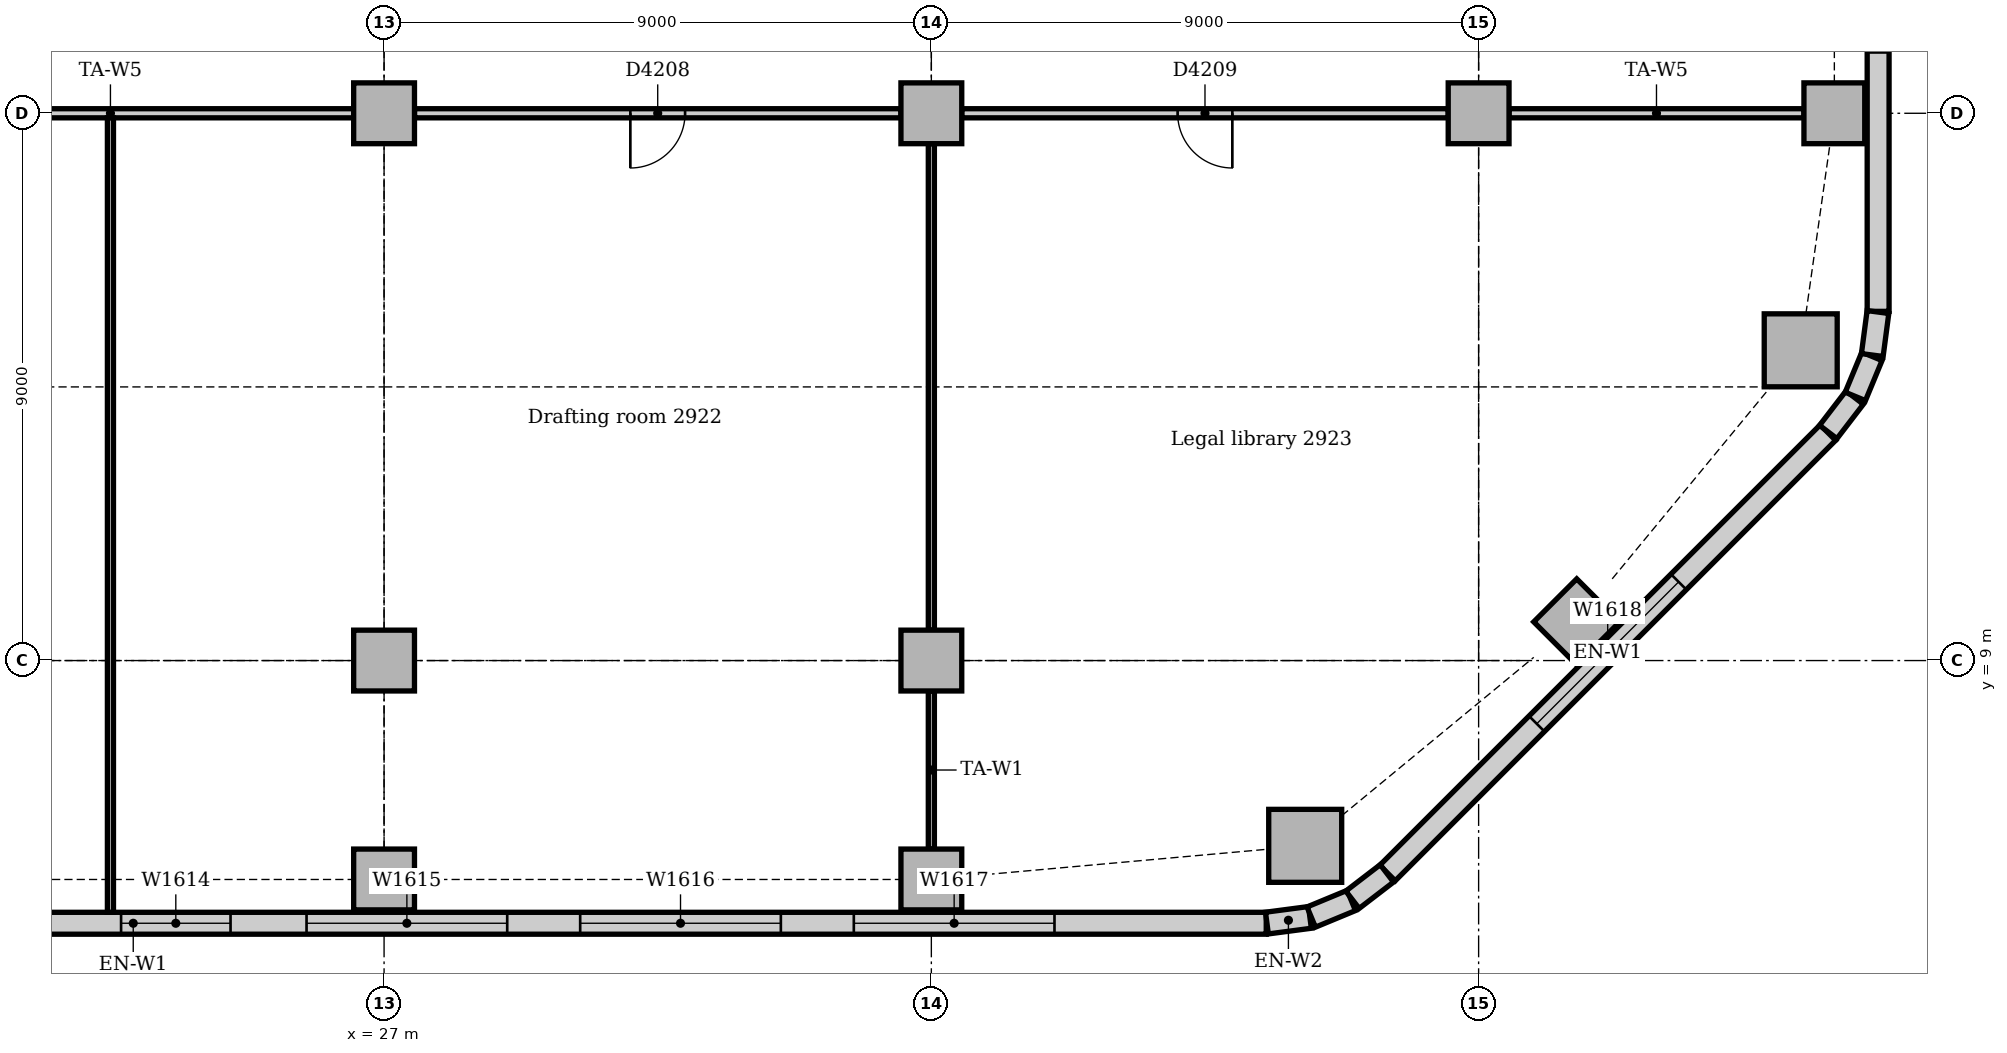
"""IFC4 building model, lengths in metres.
Left out: names, types, materials, properties, quantities, classifications, styles, units other than length and angle.
Written with IfcOpenShell. Run it as: python <this file> out.ifc"""

import sys

from ifc_helpers import new_model, si_unit, direction, frame, frame_2d, origin, origin_2d, place, context, subcontext, project, spatial, rectangle, extrude, element, fill, save


model = new_model("IFC4")
c1 = context("Model", 3, precision=1e-05, world=origin(), true_north=direction((0.0, 1.0)))
c2 = subcontext(c1, "Body", "Model", "MODEL_VIEW")
j1 = project(units=[si_unit("LENGTHUNIT", "METRE"), si_unit("PLANEANGLEUNIT", "RADIAN")], contexts=[c1])
p1 = place(None, origin())
s1 = spatial("IfcSite", under=j1, at=p1, CompositionType="ELEMENT")
p2 = place(p1, origin())
s2 = spatial("IfcBuilding", under=s1, at=p2, CompositionType="ELEMENT")
p3 = place(p2, frame((0.0, 0.0, 124.0)))
s3 = spatial("IfcBuildingStorey", under=s2, at=p3, CompositionType="ELEMENT", Elevation=124.0)
for number, where, z_axis, x_axis in (
    (1, (42.148, 5.953, 0.0), (0.0, 0.0, 1.0), (1.0, 0.0, 0.0)),
    (2, (50.297, 14.102, 0.0), (0.0, 0.0, 1.0), (1.0, 0.0, 0.0)),
):
    element("IfcColumn", number, at=place(p3, frame(where, z_axis=z_axis, x_axis=x_axis)), inside=s3, PredefinedType="COLUMN", context=c2, shape_type="SweptSolid", body=[
        extrude(rectangle(XDim=1.2, YDim=1.2, at=origin_2d()), origin(), (0.0, 0.0, 1.0), 3.85),
    ])
for number, where, z_axis, x_axis in (
    (3, (27.0, 5.4, 0.0), (0.0, 0.0, 1.0), (1.0, 0.0, 0.0)),
    (4, (36.0, 5.4, 0.0), (0.0, 0.0, 1.0), (1.0, 0.0, 0.0)),
    (5, (46.614, 9.636, 0.0), (0.0, 0.0, 1.0), (0.707, 0.707, 0.0)),
    (6, (50.85, 18.0, 0.0), (0.0, 0.0, 1.0), (1.0, 0.0, 0.0)),
    (7, (27.0, 9.0, 0.0), (0.0, 0.0, 1.0), (1.0, 0.0, 0.0)),
    (8, (27.0, 18.0, 0.0), (0.0, 0.0, 1.0), (1.0, 0.0, 0.0)),
    (9, (36.0, 9.0, 0.0), (0.0, 0.0, 1.0), (1.0, 0.0, 0.0)),
    (10, (36.0, 18.0, 0.0), (0.0, 0.0, 1.0), (1.0, 0.0, 0.0)),
    (11, (45.0, 18.0, 0.0), (0.0, 0.0, 1.0), (1.0, 0.0, 0.0)),
):
    element("IfcColumn", number, at=place(p3, frame(where, z_axis=z_axis, x_axis=x_axis)), inside=s3, PredefinedType="COLUMN", context=c2, shape_type="SweptSolid", body=[
        extrude(rectangle(XDim=1.0, YDim=1.0, at=origin_2d()), origin(), (0.0, 0.0, 1.0), 3.85),
    ])
p4 = place(p3, frame((4.243, 4.68, 0.0), z_axis=(0.0, 0.0, 1.0), x_axis=(1.0, 0.0, 0.0)))
e12 = element("IfcWall", 12, at=p4, inside=s3, PredefinedType="STANDARD", context=c2, shape_type="SweptSolid", body=[
    extrude(rectangle(XDim=37.265, YDim=0.36, at=frame_2d((18.632, 0.0))), origin(), (0.0, 0.0, 1.0), 3.85),
])
p5 = place(p4, frame((3.482, 0.0, 0.9)))
e13 = element("IfcOpeningElement", 13, at=p5, cuts=e12, PredefinedType="OPENING", context=c2, shape_type="SweptSolid", body=[
    extrude(rectangle(XDim=3.3, YDim=1.6, at=frame_2d((1.65, 0.8))), frame((0.0, 0.19, 0.0), z_axis=(0.0, -1.0, 0.0), x_axis=(1.0, 0.0, 0.0)), (0.0, 0.0, 1.0), 0.38),
])
p6 = place(p4, frame((9.432, 0.0, 0.9)))
e14 = element("IfcOpeningElement", 14, at=p6, cuts=e12, PredefinedType="OPENING", context=c2, shape_type="SweptSolid", body=[
    extrude(rectangle(XDim=1.8, YDim=1.6, at=frame_2d((0.9, 0.8))), frame((0.0, 0.19, 0.0), z_axis=(0.0, -1.0, 0.0), x_axis=(1.0, 0.0, 0.0)), (0.0, 0.0, 1.0), 0.38),
])
p7 = place(p4, frame((12.482, 0.0, 0.9)))
e15 = element("IfcOpeningElement", 15, at=p7, cuts=e12, PredefinedType="OPENING", context=c2, shape_type="SweptSolid", body=[
    extrude(rectangle(XDim=3.3, YDim=1.6, at=frame_2d((1.65, 0.8))), frame((0.0, 0.19, 0.0), z_axis=(0.0, -1.0, 0.0), x_axis=(1.0, 0.0, 0.0)), (0.0, 0.0, 1.0), 0.38),
])
p8 = place(p4, frame((18.432, 0.0, 0.9)))
e16 = element("IfcOpeningElement", 16, at=p8, cuts=e12, PredefinedType="OPENING", context=c2, shape_type="SweptSolid", body=[
    extrude(rectangle(XDim=1.8, YDim=1.6, at=frame_2d((0.9, 0.8))), frame((0.0, 0.19, 0.0), z_axis=(0.0, -1.0, 0.0), x_axis=(1.0, 0.0, 0.0)), (0.0, 0.0, 1.0), 0.38),
])
p9 = place(p4, frame((21.482, 0.0, 0.9)))
e17 = element("IfcOpeningElement", 17, at=p9, cuts=e12, PredefinedType="OPENING", context=c2, shape_type="SweptSolid", body=[
    extrude(rectangle(XDim=3.3, YDim=1.6, at=frame_2d((1.65, 0.8))), frame((0.0, 0.19, 0.0), z_axis=(0.0, -1.0, 0.0), x_axis=(1.0, 0.0, 0.0)), (0.0, 0.0, 1.0), 0.38),
])
p10 = place(p4, frame((25.982, 0.0, 0.9)))
e18 = element("IfcOpeningElement", 18, at=p10, cuts=e12, PredefinedType="OPENING", context=c2, shape_type="SweptSolid", body=[
    extrude(rectangle(XDim=3.3, YDim=1.6, at=frame_2d((1.65, 0.8))), frame((0.0, 0.19, 0.0), z_axis=(0.0, -1.0, 0.0), x_axis=(1.0, 0.0, 0.0)), (0.0, 0.0, 1.0), 0.38),
])
p11 = place(p4, frame((30.482, 0.0, 0.9)))
e19 = element("IfcOpeningElement", 19, at=p11, cuts=e12, PredefinedType="OPENING", context=c2, shape_type="SweptSolid", body=[
    extrude(rectangle(XDim=3.3, YDim=1.6, at=frame_2d((1.65, 0.8))), frame((0.0, 0.19, 0.0), z_axis=(0.0, -1.0, 0.0), x_axis=(1.0, 0.0, 0.0)), (0.0, 0.0, 1.0), 0.38),
])
p12 = place(p3, frame((43.501, 5.506, 0.0), z_axis=(0.0, 0.0, 1.0), x_axis=(0.707106781187, 0.707106781187, 0.0)))
e20 = element("IfcWall", 20, at=p12, inside=s3, PredefinedType="STANDARD", context=c2, shape_type="SweptSolid", body=[
    extrude(rectangle(XDim=10.243, YDim=0.36, at=frame_2d((5.121, 0.0))), origin(), (0.0, 0.0, 1.0), 3.85),
])
p13 = place(p12, frame((3.471, 0.0, 0.9)))
e21 = element("IfcOpeningElement", 21, at=p13, cuts=e20, PredefinedType="OPENING", context=c2, shape_type="SweptSolid", body=[
    extrude(rectangle(XDim=3.3, YDim=1.6, at=frame_2d((1.65, 0.8))), frame((0.0, 0.19, 0.0), z_axis=(0.0, -1.0, 0.0), x_axis=(1.0, 0.0, 0.0)), (0.0, 0.0, 1.0), 0.38),
])
p14 = place(p3, frame((51.57, 14.743, 0.0), z_axis=(0.0, 0.0, 1.0), x_axis=(0.0, 1.0, 0.0)))
e22 = element("IfcWall", 22, at=p14, inside=s3, PredefinedType="STANDARD", context=c2, shape_type="SweptSolid", body=[
    extrude(rectangle(XDim=24.515, YDim=0.36, at=frame_2d((12.257, 0.0))), origin(), (0.0, 0.0, 1.0), 3.85),
])
p15 = place(p14, frame((4.257, 0.0, 0.9)))
e23 = element("IfcOpeningElement", 23, at=p15, cuts=e22, PredefinedType="OPENING", context=c2, shape_type="SweptSolid", body=[
    extrude(rectangle(XDim=1.8, YDim=1.6, at=frame_2d((0.9, 0.8))), frame((0.0, 0.19, 0.0), z_axis=(0.0, -1.0, 0.0), x_axis=(1.0, 0.0, 0.0)), (0.0, 0.0, 1.0), 0.38),
])
p16 = place(p14, frame((8.357, 0.0, 0.9)))
e24 = element("IfcOpeningElement", 24, at=p16, cuts=e22, PredefinedType="OPENING", context=c2, shape_type="SweptSolid", body=[
    extrude(rectangle(XDim=3.3, YDim=1.6, at=frame_2d((1.65, 0.8))), frame((0.0, 0.19, 0.0), z_axis=(0.0, -1.0, 0.0), x_axis=(1.0, 0.0, 0.0)), (0.0, 0.0, 1.0), 0.38),
])
p17 = place(p14, frame((12.857, 0.0, 0.9)))
e25 = element("IfcOpeningElement", 25, at=p17, cuts=e22, PredefinedType="OPENING", context=c2, shape_type="SweptSolid", body=[
    extrude(rectangle(XDim=3.3, YDim=1.6, at=frame_2d((1.65, 0.8))), frame((0.0, 0.19, 0.0), z_axis=(0.0, -1.0, 0.0), x_axis=(1.0, 0.0, 0.0)), (0.0, 0.0, 1.0), 0.38),
])
p18 = place(p14, frame((17.357, 0.0, 0.9)))
e26 = element("IfcOpeningElement", 26, at=p18, cuts=e22, PredefinedType="OPENING", context=c2, shape_type="SweptSolid", body=[
    extrude(rectangle(XDim=3.3, YDim=1.6, at=frame_2d((1.65, 0.8))), frame((0.0, 0.19, 0.0), z_axis=(0.0, -1.0, 0.0), x_axis=(1.0, 0.0, 0.0)), (0.0, 0.0, 1.0), 0.38),
])
for number, where, z_axis, x_axis in (
    (27, (41.519, 4.683, 0.0), (0.0, 0.0, 1.0), (0.991, 0.131, 0.0)),
    (28, (42.247, 4.782, 0.0), (0.0, 0.0, 1.0), (0.924, 0.383, 0.0)),
):
    element("IfcWall", number, at=place(p3, frame(where, z_axis=z_axis, x_axis=x_axis)), inside=s3, PredefinedType="STANDARD", context=c2, shape_type="SweptSolid", body=[
        extrude(rectangle(XDim=0.713, YDim=0.36, at=frame_2d((0.356, 0.0))), origin(), (0.0, 0.0, 1.0), 3.85),
    ])
for number, where, z_axis, x_axis in (
    (29, (42.925, 5.066, 0.0), (0.0, 0.0, 1.0), (0.793, 0.609, 0.0)),
    (30, (50.75, 12.759, 0.0), (0.0, 0.0, 1.0), (0.609, 0.793, 0.0)),
):
    element("IfcWall", number, at=place(p3, frame(where, z_axis=z_axis, x_axis=x_axis)), inside=s3, PredefinedType="STANDARD", context=c2, shape_type="SweptSolid", body=[
        extrude(rectangle(XDim=0.713, YDim=0.36, at=frame_2d((0.357, 0.0))), origin(), (0.0, 0.0, 1.0), 3.85),
    ])
for number, where, z_axis, x_axis in (
    (31, (51.195, 13.344, 0.0), (0.0, 0.0, 1.0), (0.383, 0.924, 0.0)),
    (32, (51.474, 14.024, 0.0), (0.0, 0.0, 1.0), (0.131, 0.991, 0.0)),
):
    element("IfcWall", number, at=place(p3, frame(where, z_axis=z_axis, x_axis=x_axis)), inside=s3, PredefinedType="STANDARD", context=c2, shape_type="SweptSolid", body=[
        extrude(rectangle(XDim=0.713, YDim=0.36, at=frame_2d((0.356, 0.0))), origin(), (0.0, 0.0, 1.0), 3.85),
    ])
p19 = place(p3, frame((45.5, 18.0, 0.0), z_axis=(0.0, 0.0, 1.0), x_axis=(1.0, 0.0, 0.0)))
e33 = element("IfcWall", 33, at=p19, inside=s3, PredefinedType="PARTITIONING", context=c2, shape_type="SweptSolid", body=[
    extrude(rectangle(XDim=4.85, YDim=0.15, at=frame_2d((2.425, 0.0))), origin(), (0.0, 0.0, 1.0), 3.254),
])
p20 = place(p3, frame((36.5, 18.0, 0.0), z_axis=(0.0, 0.0, 1.0), x_axis=(1.0, 0.0, 0.0)))
e34 = element("IfcWall", 34, at=p20, inside=s3, PredefinedType="PARTITIONING", context=c2, shape_type="SweptSolid", body=[
    extrude(rectangle(XDim=8.0, YDim=0.15, at=frame_2d((4.0, 0.0))), origin(), (0.0, 0.0, 1.0), 3.158),
])
p21 = place(p20, frame((3.55, 0.0, 0.0)))
e35 = element("IfcOpeningElement", 35, at=p21, cuts=e34, PredefinedType="OPENING", context=c2, shape_type="SweptSolid", body=[
    extrude(rectangle(XDim=0.9, YDim=2.1, at=frame_2d((0.45, 1.05))), frame((0.0, 0.085, 0.0), z_axis=(0.0, -1.0, 0.0), x_axis=(1.0, 0.0, 0.0)), (0.0, 0.0, 1.0), 0.17),
])
p22 = place(p3, frame((27.5, 18.0, 0.0), z_axis=(0.0, 0.0, 1.0), x_axis=(1.0, 0.0, 0.0)))
e36 = element("IfcWall", 36, at=p22, inside=s3, PredefinedType="PARTITIONING", context=c2, shape_type="SweptSolid", body=[
    extrude(rectangle(XDim=8.0, YDim=0.15, at=frame_2d((4.0, 0.0))), origin(), (0.0, 0.0, 1.0), 3.158),
])
p23 = place(p22, frame((3.55, 0.0, 0.0)))
e37 = element("IfcOpeningElement", 37, at=p23, cuts=e36, PredefinedType="OPENING", context=c2, shape_type="SweptSolid", body=[
    extrude(rectangle(XDim=0.9, YDim=2.1, at=frame_2d((0.45, 1.05))), frame((0.0, 0.085, 0.0), z_axis=(0.0, -1.0, 0.0), x_axis=(1.0, 0.0, 0.0)), (0.0, 0.0, 1.0), 0.17),
])
p24 = place(p3, frame((18.5, 18.0, 0.0), z_axis=(0.0, 0.0, 1.0), x_axis=(1.0, 0.0, 0.0)))
e38 = element("IfcWall", 38, at=p24, inside=s3, PredefinedType="PARTITIONING", context=c2, shape_type="SweptSolid", body=[
    extrude(rectangle(XDim=8.0, YDim=0.15, at=frame_2d((4.0, 0.0))), origin(), (0.0, 0.0, 1.0), 3.158),
])
p25 = place(p24, frame((1.6, 0.0, 0.0)))
e39 = element("IfcOpeningElement", 39, at=p25, cuts=e38, PredefinedType="OPENING", context=c2, shape_type="SweptSolid", body=[
    extrude(rectangle(XDim=0.9, YDim=2.1, at=frame_2d((0.45, 1.05))), frame((0.0, 0.085, 0.0), z_axis=(0.0, -1.0, 0.0), x_axis=(1.0, 0.0, 0.0)), (0.0, 0.0, 1.0), 0.17),
])
p26 = place(p3, frame((22.5, 4.86, 0.0), z_axis=(0.0, 0.0, 1.0), x_axis=(0.0, 1.0, 0.0)))
e40 = element("IfcWall", 40, at=p26, inside=s3, PredefinedType="PARTITIONING", context=c2, shape_type="SweptSolid", body=[
    extrude(rectangle(XDim=13.065, YDim=0.1, at=frame_2d((6.532, 0.0))), origin(), (0.0, 0.0, 1.0), 3.85),
])
p27 = place(p3, frame((36.0, 5.9, 0.0), z_axis=(0.0, 0.0, 1.0), x_axis=(0.0, 1.0, 0.0)))
e41 = element("IfcWall", 41, at=p27, inside=s3, PredefinedType="PARTITIONING", context=c2, shape_type="SweptSolid", body=[
    extrude(rectangle(XDim=2.6, YDim=0.1, at=frame_2d((1.3, 0.0))), origin(), (0.0, 0.0, 1.0), 3.652),
])
p28 = place(p3, frame((36.0, 9.5, 0.0), z_axis=(0.0, 0.0, 1.0), x_axis=(0.0, 1.0, 0.0)))
e42 = element("IfcWall", 42, at=p28, inside=s3, PredefinedType="PARTITIONING", context=c2, shape_type="SweptSolid", body=[
    extrude(rectangle(XDim=8.0, YDim=0.1, at=frame_2d((4.0, 0.0))), origin(), (0.0, 0.0, 1.0), 3.256),
])
p29 = place(p8, origin())
e43 = element("IfcWindow", 43, at=p29, inside=s3, PartitioningType="SINGLE_PANEL", PredefinedType="WINDOW", context=c2, shape_type="SweptSolid", body=[
    extrude(rectangle(XDim=1.8, YDim=1.6, at=frame_2d((0.9, 0.8))), frame((0.0, 0.13, 0.0), z_axis=(0.0, -1.0, 0.0), x_axis=(1.0, 0.0, 0.0)), (0.0, 0.0, 1.0), 0.06),
])
fill(e16, e43)
p30 = place(p9, origin())
e44 = element("IfcWindow", 44, at=p30, inside=s3, PartitioningType="SINGLE_PANEL", PredefinedType="WINDOW", context=c2, shape_type="SweptSolid", body=[
    extrude(rectangle(XDim=3.3, YDim=1.6, at=frame_2d((1.65, 0.8))), frame((0.0, 0.13, 0.0), z_axis=(0.0, -1.0, 0.0), x_axis=(1.0, 0.0, 0.0)), (0.0, 0.0, 1.0), 0.06),
])
fill(e17, e44)
p31 = place(p10, origin())
e45 = element("IfcWindow", 45, at=p31, inside=s3, PartitioningType="SINGLE_PANEL", PredefinedType="WINDOW", context=c2, shape_type="SweptSolid", body=[
    extrude(rectangle(XDim=3.3, YDim=1.6, at=frame_2d((1.65, 0.8))), frame((0.0, 0.13, 0.0), z_axis=(0.0, -1.0, 0.0), x_axis=(1.0, 0.0, 0.0)), (0.0, 0.0, 1.0), 0.06),
])
fill(e18, e45)
p32 = place(p11, origin())
e46 = element("IfcWindow", 46, at=p32, inside=s3, PartitioningType="SINGLE_PANEL", PredefinedType="WINDOW", context=c2, shape_type="SweptSolid", body=[
    extrude(rectangle(XDim=3.3, YDim=1.6, at=frame_2d((1.65, 0.8))), frame((0.0, 0.13, 0.0), z_axis=(0.0, -1.0, 0.0), x_axis=(1.0, 0.0, 0.0)), (0.0, 0.0, 1.0), 0.06),
])
fill(e19, e46)
p33 = place(p13, origin())
e47 = element("IfcWindow", 47, at=p33, inside=s3, PartitioningType="SINGLE_PANEL", PredefinedType="WINDOW", context=c2, shape_type="SweptSolid", body=[
    extrude(rectangle(XDim=3.3, YDim=1.6, at=frame_2d((1.65, 0.8))), frame((0.0, 0.13, 0.0), z_axis=(0.0, -1.0, 0.0), x_axis=(1.0, 0.0, 0.0)), (0.0, 0.0, 1.0), 0.06),
])
fill(e21, e47)
p34 = place(p23, frame((0.9, 0.0, 0.0), z_axis=(0.0, 0.0, 1.0), x_axis=(-1.0, 0.0, 0.0)))
e48 = element("IfcDoor", 48, at=p34, inside=s3, OperationType="SINGLE_SWING_RIGHT", PredefinedType="DOOR", context=c2, shape_type="SweptSolid", body=[
    extrude(rectangle(XDim=0.9, YDim=2.1, at=frame_2d((0.45, 1.05))), frame((0.0, 0.025, 0.0), z_axis=(0.0, -1.0, 0.0), x_axis=(1.0, 0.0, 0.0)), (0.0, 0.0, 1.0), 0.05),
])
fill(e37, e48)
p35 = place(p21, frame((0.9, 0.0, 0.0), z_axis=(0.0, 0.0, 1.0), x_axis=(-1.0, 0.0, 0.0)))
e49 = element("IfcDoor", 49, at=p35, inside=s3, OperationType="SINGLE_SWING_LEFT", PredefinedType="DOOR", context=c2, shape_type="SweptSolid", body=[
    extrude(rectangle(XDim=0.9, YDim=2.1, at=frame_2d((0.45, 1.05))), frame((0.0, 0.025, 0.0), z_axis=(0.0, -1.0, 0.0), x_axis=(1.0, 0.0, 0.0)), (0.0, 0.0, 1.0), 0.05),
])
fill(e35, e49)
save(model, sys.argv[1])
